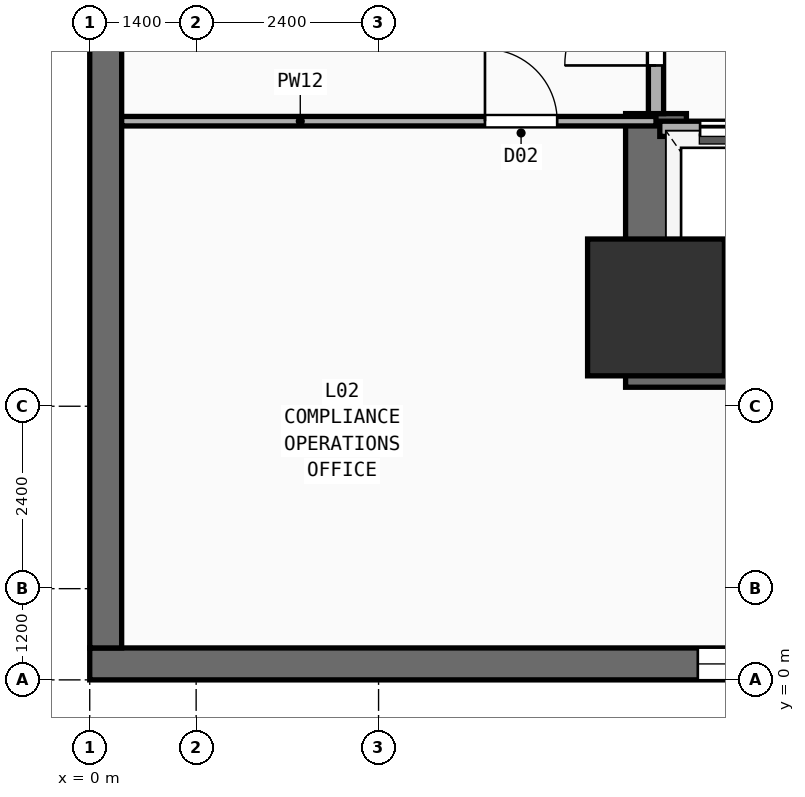
"""IFC4 building model, lengths in metres.
Left out: names, types, materials, properties, quantities, classifications, styles, units other than length and angle.
Written with IfcOpenShell. Run it as: python <this file> out.ifc"""

import sys

from ifc_helpers import new_model, si_unit, direction, frame, frame_2d, origin, origin_2d, place, context, subcontext, project, spatial, rectangle, extrude, element, fill, save


model = new_model("IFC4")
c1 = context("Model", 3, precision=1e-05, world=origin(), true_north=direction((0.0, 1.0)))
c2 = subcontext(c1, "Body", "Model", "MODEL_VIEW")
j1 = project(units=[si_unit("LENGTHUNIT", "METRE"), si_unit("PLANEANGLEUNIT", "RADIAN")], contexts=[c1])
p1 = place(None, origin())
s1 = spatial("IfcSite", under=j1, at=p1, CompositionType="ELEMENT")
p2 = place(p1, origin())
s2 = spatial("IfcBuilding", under=s1, at=p2, CompositionType="ELEMENT")
p3 = place(p2, frame((0.0, 0.0, 5.6)))
s3 = spatial("IfcBuildingStorey", under=s2, at=p3, CompositionType="ELEMENT", Elevation=5.6)
p4 = place(p3, frame((7.05, 4.25, 0.0), z_axis=(0.0, 0.0, 1.0), x_axis=(1.0, 0.0, 0.0)))
e1 = element("IfcWall", 1, at=p4, inside=s3, PredefinedType="SHEAR", context=c2, shape_type="SweptSolid", body=[
    extrude(rectangle(XDim=14.15, YDim=0.8, at=frame_2d((7.075, 0.0))), origin(), (0.0, 0.0, 1.0), 4.46),
])
p5 = place(p3, frame((7.45, 4.65, 0.0), z_axis=(0.0, 0.0, 1.0), x_axis=(0.0, 1.0, 0.0)))
e2 = element("IfcWall", 2, at=p5, inside=s3, PredefinedType="SHEAR", context=c2, shape_type="SweptSolid", body=[
    extrude(rectangle(XDim=2.8, YDim=0.8, at=frame_2d((1.4, 0.0))), origin(), (0.0, 0.0, 1.0), 4.46),
])
p6 = place(p3, frame((7.45, 4.9, 0.0), z_axis=(0.0, 0.0, 1.0), x_axis=(1.0, 0.0, 0.0)))
e3 = element("IfcColumn", 3, at=p6, inside=s3, PredefinedType="COLUMN", context=c2, shape_type="SweptSolid", body=[
    extrude(rectangle(XDim=1.8, YDim=1.8, at=origin_2d()), origin(), (0.0, 0.0, 1.0), 4.46),
])
p7 = place(p3, frame((0.0, 0.21, 0.0), z_axis=(0.0, 0.0, 1.0), x_axis=(1.0, 0.0, 0.0)))
e4 = element("IfcWall", 4, at=p7, inside=s3, PredefinedType="SOLIDWALL", context=c2, shape_type="SweptSolid", body=[
    extrude(rectangle(XDim=64.8, YDim=0.42, at=frame_2d((32.4, 0.0))), origin(), (0.0, 0.0, 1.0), 4.46),
])
p8 = place(p7, frame((8.0, 0.0, 0.95)))
e5 = element("IfcOpeningElement", 5, at=p8, cuts=e4, PredefinedType="OPENING", context=c2, shape_type="SweptSolid", body=[
    extrude(rectangle(XDim=1.5, YDim=1.8, at=frame_2d((0.75, 0.9))), frame((0.0, 0.22, 0.0), z_axis=(0.0, -1.0, 0.0), x_axis=(1.0, 0.0, 0.0)), (0.0, 0.0, 1.0), 0.44),
])
p9 = place(p7, frame((16.0, 0.0, 0.95)))
e6 = element("IfcOpeningElement", 6, at=p9, cuts=e4, PredefinedType="OPENING", context=c2, shape_type="SweptSolid", body=[
    extrude(rectangle(XDim=1.5, YDim=1.8, at=frame_2d((0.75, 0.9))), frame((0.0, 0.22, 0.0), z_axis=(0.0, -1.0, 0.0), x_axis=(1.0, 0.0, 0.0)), (0.0, 0.0, 1.0), 0.44),
])
p10 = place(p7, frame((24.0, 0.0, 0.95)))
e7 = element("IfcOpeningElement", 7, at=p10, cuts=e4, PredefinedType="OPENING", context=c2, shape_type="SweptSolid", body=[
    extrude(rectangle(XDim=1.5, YDim=1.8, at=frame_2d((0.75, 0.9))), frame((0.0, 0.22, 0.0), z_axis=(0.0, -1.0, 0.0), x_axis=(1.0, 0.0, 0.0)), (0.0, 0.0, 1.0), 0.44),
])
p11 = place(p7, frame((34.0, 0.0, 0.95)))
e8 = element("IfcOpeningElement", 8, at=p11, cuts=e4, PredefinedType="OPENING", context=c2, shape_type="SweptSolid", body=[
    extrude(rectangle(XDim=1.5, YDim=1.8, at=frame_2d((0.75, 0.9))), frame((0.0, 0.22, 0.0), z_axis=(0.0, -1.0, 0.0), x_axis=(1.0, 0.0, 0.0)), (0.0, 0.0, 1.0), 0.44),
])
p12 = place(p7, frame((44.5, 0.0, 0.95)))
e9 = element("IfcOpeningElement", 9, at=p12, cuts=e4, PredefinedType="OPENING", context=c2, shape_type="SweptSolid", body=[
    extrude(rectangle(XDim=1.5, YDim=1.8, at=frame_2d((0.75, 0.9))), frame((0.0, 0.22, 0.0), z_axis=(0.0, -1.0, 0.0), x_axis=(1.0, 0.0, 0.0)), (0.0, 0.0, 1.0), 0.44),
])
p13 = place(p7, frame((58.0, 0.0, 0.95)))
e10 = element("IfcOpeningElement", 10, at=p13, cuts=e4, PredefinedType="OPENING", context=c2, shape_type="SweptSolid", body=[
    extrude(rectangle(XDim=1.5, YDim=1.8, at=frame_2d((0.75, 0.9))), frame((0.0, 0.22, 0.0), z_axis=(0.0, -1.0, 0.0), x_axis=(1.0, 0.0, 0.0)), (0.0, 0.0, 1.0), 0.44),
])
p14 = place(p3, frame((0.21, 0.42, 0.0), z_axis=(0.0, 0.0, 1.0), x_axis=(0.0, 1.0, 0.0)))
e11 = element("IfcWall", 11, at=p14, inside=s3, PredefinedType="SOLIDWALL", context=c2, shape_type="SweptSolid", body=[
    extrude(rectangle(XDim=50.78, YDim=0.42, at=frame_2d((25.39, 0.0))), origin(), (0.0, 0.0, 1.0), 4.46),
])
p15 = place(p14, frame((8.0, 0.0, 0.95)))
e12 = element("IfcOpeningElement", 12, at=p15, cuts=e11, PredefinedType="OPENING", context=c2, shape_type="SweptSolid", body=[
    extrude(rectangle(XDim=1.5, YDim=1.8, at=frame_2d((0.75, 0.9))), frame((0.0, 0.22, 0.0), z_axis=(0.0, -1.0, 0.0), x_axis=(1.0, 0.0, 0.0)), (0.0, 0.0, 1.0), 0.44),
])
p16 = place(p14, frame((18.0, 0.0, 0.95)))
e13 = element("IfcOpeningElement", 13, at=p16, cuts=e11, PredefinedType="OPENING", context=c2, shape_type="SweptSolid", body=[
    extrude(rectangle(XDim=1.5, YDim=1.8, at=frame_2d((0.75, 0.9))), frame((0.0, 0.22, 0.0), z_axis=(0.0, -1.0, 0.0), x_axis=(1.0, 0.0, 0.0)), (0.0, 0.0, 1.0), 0.44),
])
p17 = place(p14, frame((27.5, 0.0, 0.95)))
e14 = element("IfcOpeningElement", 14, at=p17, cuts=e11, PredefinedType="OPENING", context=c2, shape_type="SweptSolid", body=[
    extrude(rectangle(XDim=1.5, YDim=1.8, at=frame_2d((0.75, 0.9))), frame((0.0, 0.22, 0.0), z_axis=(0.0, -1.0, 0.0), x_axis=(1.0, 0.0, 0.0)), (0.0, 0.0, 1.0), 0.44),
])
p18 = place(p14, frame((45.0, 0.0, 0.95)))
e15 = element("IfcOpeningElement", 15, at=p18, cuts=e11, PredefinedType="OPENING", context=c2, shape_type="SweptSolid", body=[
    extrude(rectangle(XDim=1.5, YDim=1.8, at=frame_2d((0.75, 0.9))), frame((0.0, 0.22, 0.0), z_axis=(0.0, -1.0, 0.0), x_axis=(1.0, 0.0, 0.0)), (0.0, 0.0, 1.0), 0.44),
])
p19 = place(p3, frame((7.5, 7.25, 0.0), z_axis=(0.0, 0.0, 1.0), x_axis=(1.0, 0.0, 0.0)))
e16 = element("IfcWall", 16, at=p19, inside=s3, PredefinedType="PARTITIONING", context=c2, shape_type="SweptSolid", body=[
    extrude(rectangle(XDim=8.35, YDim=0.2, at=frame_2d((4.175, 0.0))), origin(), (0.0, 0.0, 1.0), 4.46),
])
p20 = place(p19, frame((0.53, 0.0, 0.0)))
e17 = element("IfcOpeningElement", 17, at=p20, cuts=e16, PredefinedType="OPENING", context=c2, shape_type="SweptSolid", body=[
    extrude(rectangle(XDim=1.1, YDim=2.2, at=frame_2d((0.55, 1.1))), frame((0.0, 0.11, 0.0), z_axis=(0.0, -1.0, 0.0), x_axis=(1.0, 0.0, 0.0)), (0.0, 0.0, 1.0), 0.22),
])
p21 = place(p19, frame((2.37, 0.0, 0.0)))
e18 = element("IfcOpeningElement", 18, at=p21, cuts=e16, PredefinedType="OPENING", context=c2, shape_type="SweptSolid", body=[
    extrude(rectangle(XDim=1.1, YDim=2.2, at=frame_2d((0.55, 1.1))), frame((0.0, 0.11, 0.0), z_axis=(0.0, -1.0, 0.0), x_axis=(1.0, 0.0, 0.0)), (0.0, 0.0, 1.0), 0.22),
])
p22 = place(p19, frame((4.33, 0.0, 0.0)))
e19 = element("IfcOpeningElement", 19, at=p22, cuts=e16, PredefinedType="OPENING", context=c2, shape_type="SweptSolid", body=[
    extrude(rectangle(XDim=1.1, YDim=2.2, at=frame_2d((0.55, 1.1))), frame((0.0, 0.11, 0.0), z_axis=(0.0, -1.0, 0.0), x_axis=(1.0, 0.0, 0.0)), (0.0, 0.0, 1.0), 0.22),
])
p23 = place(p19, frame((6.5, 0.0, 0.0)))
e20 = element("IfcOpeningElement", 20, at=p23, cuts=e16, PredefinedType="OPENING", context=c2, shape_type="SweptSolid", body=[
    extrude(rectangle(XDim=1.1, YDim=2.2, at=frame_2d((0.55, 1.1))), frame((0.0, 0.11, 0.0), z_axis=(0.0, -1.0, 0.0), x_axis=(1.0, 0.0, 0.0)), (0.0, 0.0, 1.0), 0.22),
])
p24 = place(p3, frame((7.45, 7.45, 0.0), z_axis=(0.0, 0.0, 1.0), x_axis=(0.0, 1.0, 0.0)))
e21 = element("IfcWall", 21, at=p24, inside=s3, PredefinedType="PARTITIONING", context=c2, shape_type="SweptSolid", body=[
    extrude(rectangle(XDim=2.3, YDim=0.2, at=frame_2d((1.15, 0.0))), origin(), (0.0, 0.0, 1.0), 3.24),
])
p25 = place(p24, frame((0.633, 0.0, 0.0)))
e22 = element("IfcOpeningElement", 22, at=p25, cuts=e21, PredefinedType="OPENING", context=c2, shape_type="SweptSolid", body=[
    extrude(rectangle(XDim=1.2, YDim=2.25, at=frame_2d((0.6, 1.125))), frame((0.0, 0.11, 0.0), z_axis=(0.0, -1.0, 0.0), x_axis=(1.0, 0.0, 0.0)), (0.0, 0.0, 1.0), 0.22),
])
p26 = place(p3, frame((0.42, 7.35, 0.0), z_axis=(0.0, 0.0, 1.0), x_axis=(1.0, 0.0, 0.0)))
e23 = element("IfcWall", 23, at=p26, inside=s3, PredefinedType="PARTITIONING", context=c2, shape_type="SweptSolid", body=[
    extrude(rectangle(XDim=7.03, YDim=0.125, at=frame_2d((3.515, 0.0))), origin(), (0.0, 0.0, 1.0), 4.46),
])
p27 = place(p26, frame((4.78, 0.0, 0.0)))
e24 = element("IfcOpeningElement", 24, at=p27, cuts=e23, PredefinedType="OPENING", context=c2, shape_type="SweptSolid", body=[
    extrude(rectangle(XDim=0.95, YDim=2.15, at=frame_2d((0.475, 1.075))), frame((0.0, 0.073, 0.0), z_axis=(0.0, -1.0, 0.0), x_axis=(1.0, 0.0, 0.0)), (0.0, 0.0, 1.0), 0.145),
])
p28 = place(p8, origin())
e25 = element("IfcWindow", 25, at=p28, inside=s3, PartitioningType="SINGLE_PANEL", PredefinedType="WINDOW", context=c2, shape_type="SweptSolid", body=[
    extrude(rectangle(XDim=1.5, YDim=1.8, at=frame_2d((0.75, 0.9))), frame((0.0, 0.03, 0.0), z_axis=(0.0, -1.0, 0.0), x_axis=(1.0, 0.0, 0.0)), (0.0, 0.0, 1.0), 0.06),
])
fill(e5, e25)
p29 = place(p20, origin())
e26 = element("IfcDoor", 26, at=p29, inside=s3, OperationType="SLIDING_TO_LEFT", PredefinedType="DOOR", context=c2, shape_type="SweptSolid", body=[
    extrude(rectangle(XDim=1.1, YDim=2.2, at=frame_2d((0.55, 1.1))), frame((0.0, 0.025, 0.0), z_axis=(0.0, -1.0, 0.0), x_axis=(1.0, 0.0, 0.0)), (0.0, 0.0, 1.0), 0.05),
])
fill(e17, e26)
p30 = place(p25, frame((1.2, 0.0, 0.0), z_axis=(0.0, 0.0, 1.0), x_axis=(-1.0, 0.0, 0.0)))
e27 = element("IfcDoor", 27, at=p30, inside=s3, OperationType="SINGLE_SWING_RIGHT", PredefinedType="DOOR", context=c2, shape_type="SweptSolid", body=[
    extrude(rectangle(XDim=1.2, YDim=2.25, at=frame_2d((0.6, 1.125))), frame((0.0, 0.025, 0.0), z_axis=(0.0, -1.0, 0.0), x_axis=(1.0, 0.0, 0.0)), (0.0, 0.0, 1.0), 0.05),
])
fill(e22, e27)
p31 = place(p27, origin())
e28 = element("IfcDoor", 28, at=p31, inside=s3, OperationType="SINGLE_SWING_LEFT", PredefinedType="DOOR", context=c2, shape_type="SweptSolid", body=[
    extrude(rectangle(XDim=0.95, YDim=2.15, at=frame_2d((0.475, 1.075))), frame((0.0, 0.025, 0.0), z_axis=(0.0, -1.0, 0.0), x_axis=(1.0, 0.0, 0.0)), (0.0, 0.0, 1.0), 0.05),
])
fill(e24, e28)
save(model, sys.argv[1])
